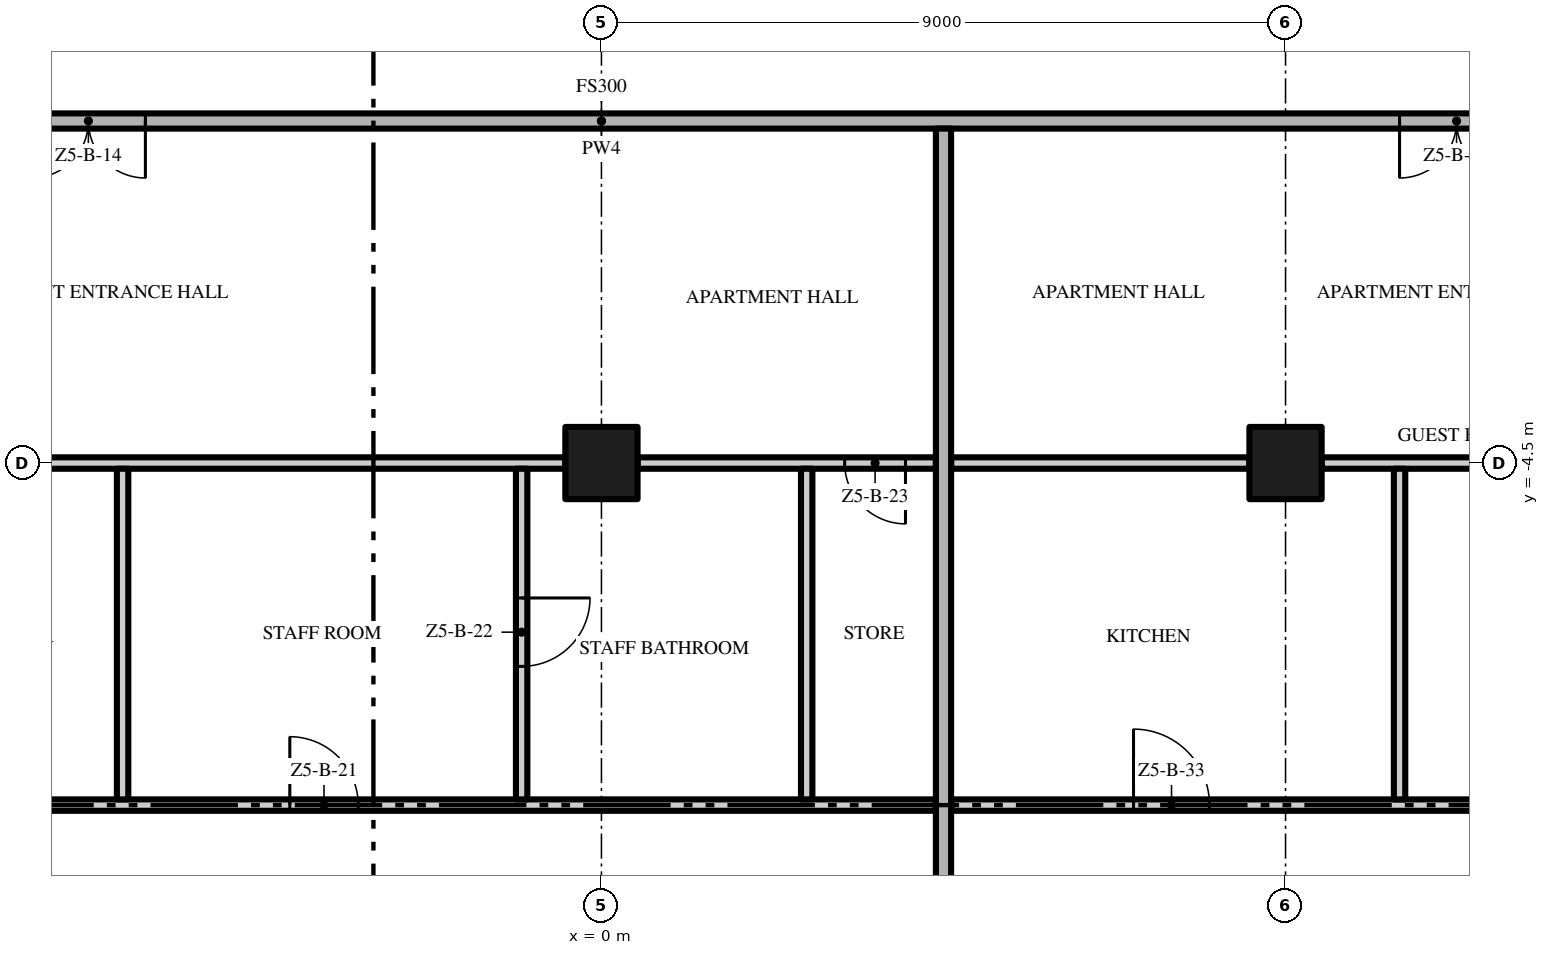
"""IFC4 building model, lengths in metres.
Left out: names, types, materials, properties, quantities, classifications, styles, units other than length and angle.
Written with IfcOpenShell. Run it as: python <this file> out.ifc"""

import sys

from ifc_helpers import new_model, si_unit, direction, frame, frame_2d, origin, origin_2d, place, context, subcontext, project, spatial, rectangle, extrude, element, fill, save


model = new_model("IFC4")
c1 = context("Model", 3, precision=1e-05, world=origin(), true_north=direction((0.0, 1.0)))
c2 = subcontext(c1, "Body", "Model", "MODEL_VIEW")
j1 = project(units=[si_unit("LENGTHUNIT", "METRE"), si_unit("PLANEANGLEUNIT", "RADIAN")], contexts=[c1])
p1 = place(None, origin())
s1 = spatial("IfcSite", under=j1, at=p1, CompositionType="ELEMENT")
p2 = place(p1, origin())
s2 = spatial("IfcBuilding", under=s1, at=p2, CompositionType="ELEMENT")
p3 = place(p2, frame((0.0, 0.0, 257.8)))
s3 = spatial("IfcBuildingStorey", under=s2, at=p3, CompositionType="ELEMENT", Elevation=257.8)
for number, where, z_axis, x_axis in (
    (1, (0.0, -4.5, 0.0), (0.0, 0.0, 1.0), (1.0, 0.0, 0.0)),
    (2, (9.0, -4.5, 0.0), (0.0, 0.0, 1.0), (1.0, 0.0, 0.0)),
):
    element("IfcColumn", number, at=place(p3, frame(where, z_axis=z_axis, x_axis=x_axis)), inside=s3, PredefinedType="COLUMN", context=c2, shape_type="SweptSolid", body=[
        extrude(rectangle(XDim=0.95, YDim=0.95, at=origin_2d()), origin(), (0.0, 0.0, 1.0), 3.5),
    ])
p4 = place(p3, frame((-9.225, -9.0, 0.0), z_axis=(0.0, 0.0, 1.0), x_axis=(1.0, 0.0, 0.0)))
e3 = element("IfcWall", 3, at=p4, inside=s3, PredefinedType="PARTITIONING", context=c2, shape_type="SweptSolid", body=[
    extrude(rectangle(XDim=13.625, YDim=0.15, at=frame_2d((6.812, 0.0))), origin(), (0.0, 0.0, 1.0), 3.5),
])
p5 = place(p4, frame((1.0, 0.0, 0.0)))
e4 = element("IfcOpeningElement", 4, at=p5, cuts=e3, PredefinedType="OPENING", context=c2, shape_type="SweptSolid", body=[
    extrude(rectangle(XDim=0.9, YDim=2.1, at=frame_2d((0.45, 1.05))), frame((0.0, 0.085, 0.0), z_axis=(0.0, -1.0, 0.0), x_axis=(1.0, 0.0, 0.0)), (0.0, 0.0, 1.0), 0.17),
])
p6 = place(p4, frame((5.125, 0.0, 0.0)))
e5 = element("IfcOpeningElement", 5, at=p6, cuts=e3, PredefinedType="OPENING", context=c2, shape_type="SweptSolid", body=[
    extrude(rectangle(XDim=0.9, YDim=2.1, at=frame_2d((0.45, 1.05))), frame((0.0, 0.085, 0.0), z_axis=(0.0, -1.0, 0.0), x_axis=(1.0, 0.0, 0.0)), (0.0, 0.0, 1.0), 0.17),
])
p7 = place(p3, frame((4.6, -9.0, 0.0), z_axis=(0.0, 0.0, 1.0), x_axis=(1.0, 0.0, 0.0)))
e6 = element("IfcWall", 6, at=p7, inside=s3, PredefinedType="PARTITIONING", context=c2, shape_type="SweptSolid", body=[
    extrude(rectangle(XDim=8.075, YDim=0.15, at=frame_2d((4.037, 0.0))), origin(), (0.0, 0.0, 1.0), 3.5),
])
p8 = place(p7, frame((2.4, 0.0, 0.0)))
e7 = element("IfcOpeningElement", 7, at=p8, cuts=e6, PredefinedType="OPENING", context=c2, shape_type="SweptSolid", body=[
    extrude(rectangle(XDim=1.0, YDim=2.4, at=frame_2d((0.5, 1.2))), frame((0.0, 0.085, 0.0), z_axis=(0.0, -1.0, 0.0), x_axis=(1.0, 0.0, 0.0)), (0.0, 0.0, 1.0), 0.17),
])
p9 = place(p3, frame((-8.525, -4.5, 0.0), z_axis=(0.0, 0.0, 1.0), x_axis=(1.0, 0.0, 0.0)))
e8 = element("IfcWall", 8, at=p9, inside=s3, PredefinedType="PARTITIONING", context=c2, shape_type="SweptSolid", body=[
    extrude(rectangle(XDim=8.05, YDim=0.15, at=frame_2d((4.025, 0.0))), origin(), (0.0, 0.0, 1.0), 3.5),
])
p10 = place(p3, frame((4.4, -4.5, 0.0), z_axis=(0.0, 0.0, 1.0), x_axis=(-1.0, 0.0, 0.0)))
e9 = element("IfcWall", 9, at=p10, inside=s3, PredefinedType="PARTITIONING", context=c2, shape_type="SweptSolid", body=[
    extrude(rectangle(XDim=3.925, YDim=0.15, at=frame_2d((1.962, 0.0))), origin(), (0.0, 0.0, 1.0), 3.5),
])
p11 = place(p10, frame((0.4, 0.0, 0.0)))
e10 = element("IfcOpeningElement", 10, at=p11, cuts=e9, PredefinedType="OPENING", context=c2, shape_type="SweptSolid", body=[
    extrude(rectangle(XDim=0.8, YDim=2.0, at=frame_2d((0.4, 1.0))), frame((0.0, 0.085, 0.0), z_axis=(0.0, -1.0, 0.0), x_axis=(1.0, 0.0, 0.0)), (0.0, 0.0, 1.0), 0.17),
])
p12 = place(p3, frame((4.6, -4.5, 0.0), z_axis=(0.0, 0.0, 1.0), x_axis=(1.0, 0.0, 0.0)))
e11 = element("IfcWall", 11, at=p12, inside=s3, PredefinedType="PARTITIONING", context=c2, shape_type="SweptSolid", body=[
    extrude(rectangle(XDim=3.925, YDim=0.15, at=frame_2d((1.962, 0.0))), origin(), (0.0, 0.0, 1.0), 3.5),
])
p13 = place(p3, frame((9.475, -4.5, 0.0), z_axis=(0.0, 0.0, 1.0), x_axis=(1.0, 0.0, 0.0)))
e12 = element("IfcWall", 12, at=p13, inside=s3, PredefinedType="PARTITIONING", context=c2, shape_type="SweptSolid", body=[
    extrude(rectangle(XDim=4.025, YDim=0.15, at=frame_2d((2.013, 0.0))), origin(), (0.0, 0.0, 1.0), 3.5),
])
p14 = place(p3, frame((17.4, 0.0, 0.0), z_axis=(0.0, 0.0, 1.0), x_axis=(-1.0, 0.0, 0.0)))
e13 = element("IfcWall", 13, at=p14, inside=s3, PredefinedType="PARTITIONING", context=c2, shape_type="SweptSolid", body=[
    extrude(rectangle(XDim=34.8, YDim=0.2, at=frame_2d((17.4, 0.0))), origin(), (0.0, 0.0, 1.0), 3.5),
])
p15 = place(p14, frame((23.4, 0.0, 0.0)))
e14 = element("IfcOpeningElement", 14, at=p15, cuts=e13, PredefinedType="OPENING", context=c2, shape_type="SweptSolid", body=[
    extrude(rectangle(XDim=1.5, YDim=2.4, at=frame_2d((0.75, 1.2))), frame((0.0, 0.11, 0.0), z_axis=(0.0, -1.0, 0.0), x_axis=(1.0, 0.0, 0.0)), (0.0, 0.0, 1.0), 0.22),
])
p16 = place(p14, frame((5.4, 0.0, 0.0)))
e15 = element("IfcOpeningElement", 15, at=p16, cuts=e13, PredefinedType="OPENING", context=c2, shape_type="SweptSolid", body=[
    extrude(rectangle(XDim=1.5, YDim=2.4, at=frame_2d((0.75, 1.2))), frame((0.0, 0.11, 0.0), z_axis=(0.0, -1.0, 0.0), x_axis=(1.0, 0.0, 0.0)), (0.0, 0.0, 1.0), 0.22),
])
p17 = place(p3, frame((-6.3, -8.925, 0.0), z_axis=(0.0, 0.0, 1.0), x_axis=(0.0, 1.0, 0.0)))
e16 = element("IfcWall", 16, at=p17, inside=s3, PredefinedType="PARTITIONING", context=c2, shape_type="SweptSolid", body=[
    extrude(rectangle(XDim=4.35, YDim=0.15, at=frame_2d((2.175, 0.0))), origin(), (0.0, 0.0, 1.0), 3.5),
])
p18 = place(p3, frame((-1.05, -4.575, 0.0), z_axis=(0.0, 0.0, 1.0), x_axis=(0.0, -1.0, 0.0)))
e17 = element("IfcWall", 17, at=p18, inside=s3, PredefinedType="PARTITIONING", context=c2, shape_type="SweptSolid", body=[
    extrude(rectangle(XDim=4.35, YDim=0.15, at=frame_2d((2.175, 0.0))), origin(), (0.0, 0.0, 1.0), 3.5),
])
p19 = place(p18, frame((1.7, 0.0, 0.0)))
e18 = element("IfcOpeningElement", 18, at=p19, cuts=e17, PredefinedType="OPENING", context=c2, shape_type="SweptSolid", body=[
    extrude(rectangle(XDim=0.9, YDim=2.1, at=frame_2d((0.45, 1.05))), frame((0.0, 0.085, 0.0), z_axis=(0.0, -1.0, 0.0), x_axis=(1.0, 0.0, 0.0)), (0.0, 0.0, 1.0), 0.17),
])
p20 = place(p3, frame((2.7, -8.925, 0.0), z_axis=(0.0, 0.0, 1.0), x_axis=(0.0, 1.0, 0.0)))
e19 = element("IfcWall", 19, at=p20, inside=s3, PredefinedType="PARTITIONING", context=c2, shape_type="SweptSolid", body=[
    extrude(rectangle(XDim=4.35, YDim=0.15, at=frame_2d((2.175, 0.0))), origin(), (0.0, 0.0, 1.0), 3.5),
])
p21 = place(p3, frame((4.5, -22.2, 0.0), z_axis=(0.0, 0.0, 1.0), x_axis=(0.0, 1.0, 0.0)))
e20 = element("IfcWall", 20, at=p21, inside=s3, PredefinedType="PARTITIONING", context=c2, shape_type="SweptSolid", body=[
    extrude(rectangle(XDim=22.1, YDim=0.2, at=frame_2d((11.05, 0.0))), origin(), (0.0, 0.0, 1.0), 3.5),
])
p22 = place(p3, frame((10.5, -8.925, 0.0), z_axis=(0.0, 0.0, 1.0), x_axis=(0.0, 1.0, 0.0)))
e21 = element("IfcWall", 21, at=p22, inside=s3, PredefinedType="PARTITIONING", context=c2, shape_type="SweptSolid", body=[
    extrude(rectangle(XDim=4.35, YDim=0.15, at=frame_2d((2.175, 0.0))), origin(), (0.0, 0.0, 1.0), 3.5),
])
p23 = place(p15, origin())
e22 = element("IfcDoor", 22, at=p23, inside=s3, OperationType="DOUBLE_DOOR_SINGLE_SWING", PredefinedType="DOOR", context=c2, shape_type="SweptSolid", body=[
    extrude(rectangle(XDim=1.5, YDim=2.4, at=frame_2d((0.75, 1.2))), frame((0.0, 0.025, 0.0), z_axis=(0.0, -1.0, 0.0), x_axis=(1.0, 0.0, 0.0)), (0.0, 0.0, 1.0), 0.05),
])
fill(e14, e22)
p24 = place(p6, origin())
e23 = element("IfcDoor", 23, at=p24, inside=s3, OperationType="SINGLE_SWING_LEFT", PredefinedType="DOOR", context=c2, shape_type="SweptSolid", body=[
    extrude(rectangle(XDim=0.9, YDim=2.1, at=frame_2d((0.45, 1.05))), frame((0.0, 0.025, 0.0), z_axis=(0.0, -1.0, 0.0), x_axis=(1.0, 0.0, 0.0)), (0.0, 0.0, 1.0), 0.05),
])
fill(e5, e23)
p25 = place(p19, origin())
e24 = element("IfcDoor", 24, at=p25, inside=s3, OperationType="SINGLE_SWING_LEFT", PredefinedType="DOOR", context=c2, shape_type="SweptSolid", body=[
    extrude(rectangle(XDim=0.9, YDim=2.1, at=frame_2d((0.45, 1.05))), frame((0.0, 0.025, 0.0), z_axis=(0.0, -1.0, 0.0), x_axis=(1.0, 0.0, 0.0)), (0.0, 0.0, 1.0), 0.05),
])
fill(e18, e24)
p26 = place(p11, origin())
e25 = element("IfcDoor", 25, at=p26, inside=s3, OperationType="SINGLE_SWING_LEFT", PredefinedType="DOOR", context=c2, shape_type="SweptSolid", body=[
    extrude(rectangle(XDim=0.8, YDim=2.0, at=frame_2d((0.4, 1.0))), frame((0.0, 0.025, 0.0), z_axis=(0.0, -1.0, 0.0), x_axis=(1.0, 0.0, 0.0)), (0.0, 0.0, 1.0), 0.05),
])
fill(e10, e25)
p27 = place(p16, origin())
e26 = element("IfcDoor", 26, at=p27, inside=s3, OperationType="DOUBLE_DOOR_SINGLE_SWING", PredefinedType="DOOR", context=c2, shape_type="SweptSolid", body=[
    extrude(rectangle(XDim=1.5, YDim=2.4, at=frame_2d((0.75, 1.2))), frame((0.0, 0.025, 0.0), z_axis=(0.0, -1.0, 0.0), x_axis=(1.0, 0.0, 0.0)), (0.0, 0.0, 1.0), 0.05),
])
fill(e15, e26)
p28 = place(p8, origin())
e27 = element("IfcDoor", 27, at=p28, inside=s3, OperationType="SINGLE_SWING_LEFT", PredefinedType="DOOR", context=c2, shape_type="SweptSolid", body=[
    extrude(rectangle(XDim=1.0, YDim=2.4, at=frame_2d((0.5, 1.2))), frame((0.0, 0.025, 0.0), z_axis=(0.0, -1.0, 0.0), x_axis=(1.0, 0.0, 0.0)), (0.0, 0.0, 1.0), 0.05),
])
fill(e7, e27)
save(model, sys.argv[1])
